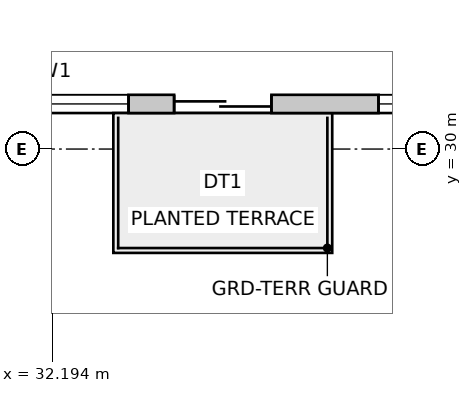
"""IFC4 building model, lengths in metres.
Left out: names, types, materials, properties, quantities, classifications, styles, units other than length and angle.
Written with IfcOpenShell. Run it as: python <this file> out.ifc"""

import sys

from ifc_helpers import new_model, si_unit, direction, frame, frame_2d, origin, place, context, subcontext, project, spatial, rectangle, extrude, source, transform, mapped, element, fill, save


model = new_model("IFC4")
c1 = context("Model", 3, precision=1e-05, world=origin(), true_north=direction((0.0, 1.0)))
c2 = subcontext(c1, "Body", "Model", "MODEL_VIEW")
j1 = project(units=[si_unit("LENGTHUNIT", "METRE"), si_unit("PLANEANGLEUNIT", "RADIAN")], contexts=[c1])
p1 = place(None, origin())
s1 = spatial("IfcSite", under=j1, at=p1, CompositionType="ELEMENT")
p2 = place(p1, origin())
s2 = spatial("IfcBuilding", under=s1, at=p2, CompositionType="ELEMENT")
p3 = place(p2, frame((0.0, 0.0, 139.4)))
s3 = spatial("IfcBuildingStorey", under=s2, at=p3, CompositionType="ELEMENT", Elevation=139.4)
p4 = place(p3, frame((30.261, 30.742, 0.0), z_axis=(0.0, 0.0, 1.0), x_axis=(1.0, 0.0, 0.0)))
e1 = element("IfcWall", 1, at=p4, inside=s3, PredefinedType="SOLIDWALL", context=c2, shape_type="SweptSolid", body=[
    extrude(rectangle(XDim=22.227, YDim=0.3, at=frame_2d((11.113, 0.0))), origin(), (0.0, 0.0, 1.0), 3.35),
])
m1 = source(origin(), c2, "Body", "SweptSolid", [
    extrude(rectangle(XDim=1.6, YDim=2.15, at=frame_2d((0.8, 1.075))), frame((0.0, 0.16, 0.0), z_axis=(0.0, -1.0, 0.0), x_axis=(1.0, 0.0, 0.0)), (0.0, 0.0, 1.0), 0.32),
])
p5 = place(p4, frame((3.939, 0.0, 0.0)))
e2 = element("IfcOpeningElement", 2, at=p5, cuts=e1, PredefinedType="OPENING", context=c2, shape_type="MappedRepresentation", body=[
    mapped(m1, transform((0.0, 0.0, 0.0), scale=1.0)),
])
m2 = source(origin(), c2, "Body", "SweptSolid", [
    extrude(rectangle(XDim=2.4, YDim=2.2, at=frame_2d((1.2, 1.1))), frame((0.0, 0.16, 0.0), z_axis=(0.0, -1.0, 0.0), x_axis=(1.0, 0.0, 0.0)), (0.0, 0.0, 1.0), 0.32),
])
p6 = place(p4, frame((0.789, 0.0, 0.85)))
e3 = element("IfcOpeningElement", 3, at=p6, cuts=e1, PredefinedType="OPENING", context=c2, shape_type="MappedRepresentation", body=[
    mapped(m2, transform((0.0, 0.0, 0.0), scale=1.0)),
])
p7 = place(p4, frame((7.3, 0.0, 0.85)))
e4 = element("IfcOpeningElement", 4, at=p7, cuts=e1, PredefinedType="OPENING", context=c2, shape_type="MappedRepresentation", body=[
    mapped(m2, transform((0.0, 0.0, 0.0), scale=1.0)),
])
m3 = source(origin(), c2, "Body", "SweptSolid", [
    extrude(rectangle(XDim=2.1, YDim=2.0, at=frame_2d((1.05, 1.0))), frame((0.0, 0.16, 0.0), z_axis=(0.0, -1.0, 0.0), x_axis=(1.0, 0.0, 0.0)), (0.0, 0.0, 1.0), 0.32),
])
p8 = place(p4, frame((12.813, 0.0, 0.85)))
e5 = element("IfcOpeningElement", 5, at=p8, cuts=e1, PredefinedType="OPENING", context=c2, shape_type="MappedRepresentation", body=[
    mapped(m3, transform((0.0, 0.0, 0.0), scale=1.0)),
])
p9 = place(p4, frame((18.026, 0.0, 0.85)))
e6 = element("IfcOpeningElement", 6, at=p9, cuts=e1, PredefinedType="OPENING", context=c2, shape_type="MappedRepresentation", body=[
    mapped(m2, transform((0.0, 0.0, 0.0), scale=1.0)),
])
m4 = source(origin(), c2, "Body", "SweptSolid", [
    extrude(rectangle(XDim=1.6, YDim=2.15, at=frame_2d((0.8, 1.075))), frame((0.0, 0.025, 0.0), z_axis=(0.0, -1.0, 0.0), x_axis=(1.0, 0.0, 0.0)), (0.0, 0.0, 1.0), 0.05),
])
p10 = place(p5, origin())
e7 = element("IfcDoor", 7, at=p10, inside=s3, OperationType="DOUBLE_DOOR_SLIDING", PredefinedType="DOOR", context=c2, shape_type="MappedRepresentation", body=[
    mapped(m4, transform((0.0, 0.0, 0.0), scale=1.0)),
])
fill(e2, e7)
m5 = source(origin(), c2, "Body", "SweptSolid", [
    extrude(rectangle(XDim=2.4, YDim=2.2, at=frame_2d((1.2, 1.1))), frame((0.0, -0.015, 0.0), z_axis=(0.0, -1.0, 0.0), x_axis=(1.0, 0.0, 0.0)), (0.0, 0.0, 1.0), 0.06),
])
p11 = place(p6, origin())
e8 = element("IfcWindow", 8, at=p11, inside=s3, PartitioningType="SINGLE_PANEL", PredefinedType="WINDOW", context=c2, shape_type="MappedRepresentation", body=[
    mapped(m5, transform((0.0, 0.0, 0.0), scale=1.0)),
])
fill(e3, e8)
p12 = place(p7, origin())
e9 = element("IfcWindow", 9, at=p12, inside=s3, PartitioningType="SINGLE_PANEL", PredefinedType="WINDOW", context=c2, shape_type="MappedRepresentation", body=[
    mapped(m5, transform((0.0, 0.0, 0.0), scale=1.0)),
])
fill(e4, e9)
save(model, sys.argv[1])
